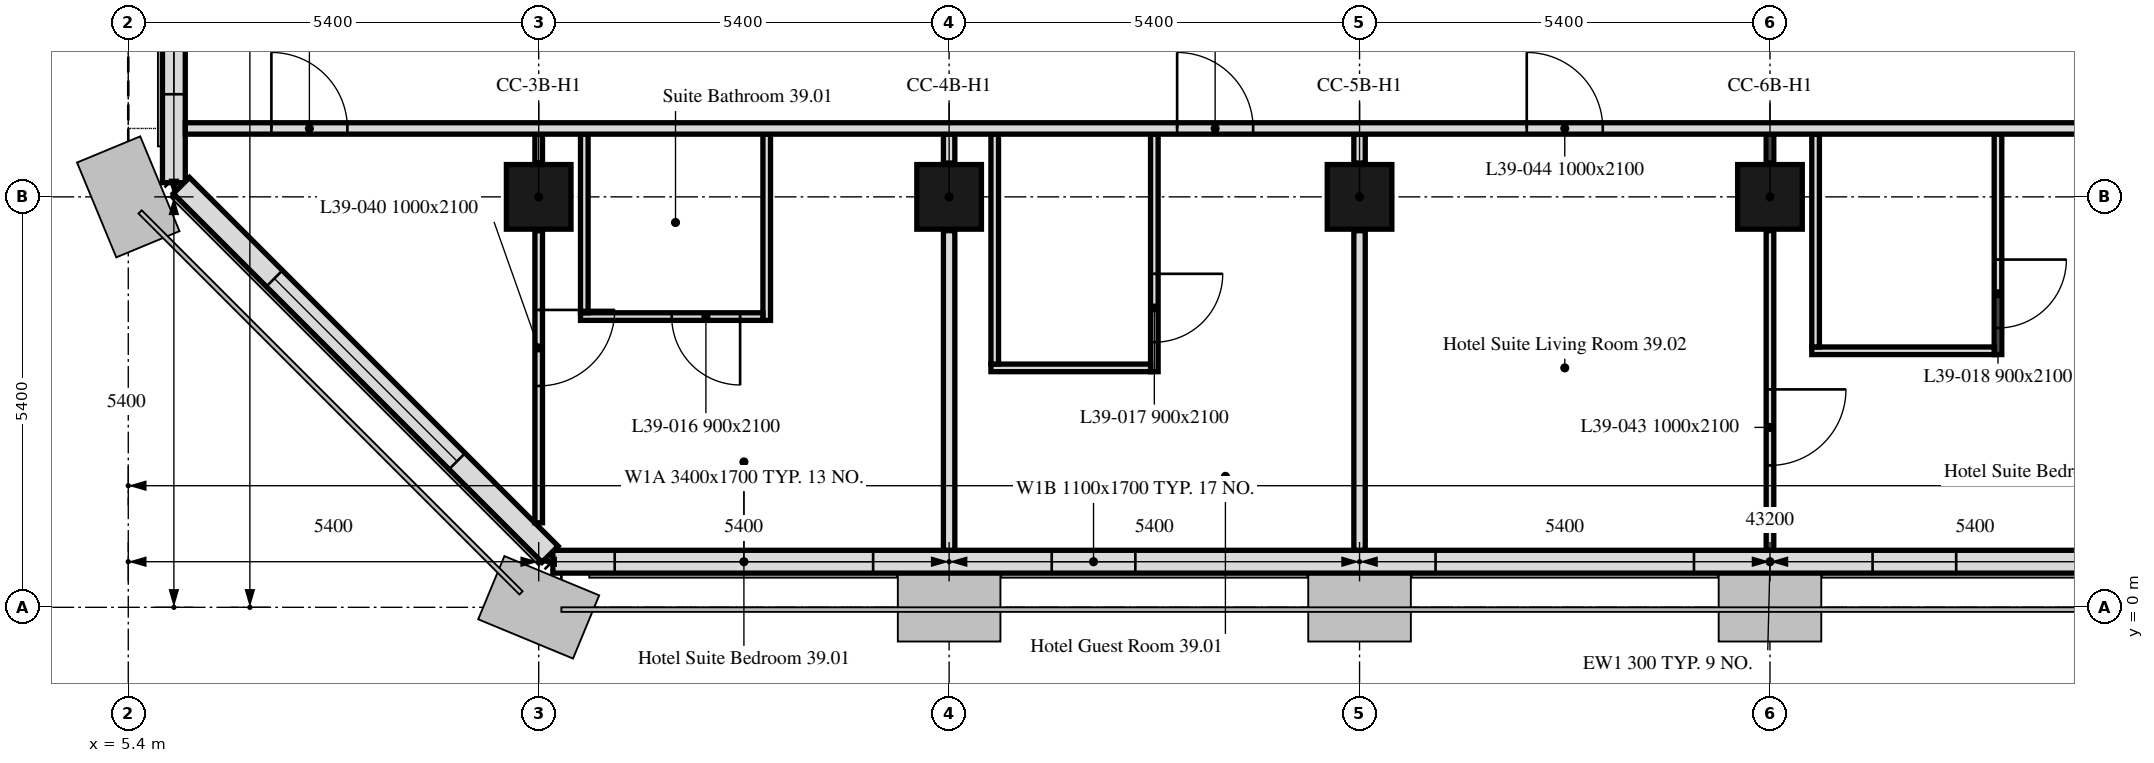
"""IFC4 building model, lengths in metres.
Left out: names, types, materials, properties, quantities, classifications, styles, units other than length and angle.
Written with IfcOpenShell. Run it as: python <this file> out.ifc"""

import sys

from ifc_helpers import new_model, si_unit, direction, frame, frame_2d, origin, origin_2d, place, context, subcontext, project, spatial, rectangle, extrude, element, fill, save


model = new_model("IFC4")
c1 = context("Model", 3, precision=1e-05, world=origin(), true_north=direction((0.0, 1.0)))
c2 = subcontext(c1, "Body", "Model", "MODEL_VIEW")
j1 = project(units=[si_unit("LENGTHUNIT", "METRE"), si_unit("PLANEANGLEUNIT", "RADIAN")], contexts=[c1])
p1 = place(None, origin())
s1 = spatial("IfcSite", under=j1, at=p1, CompositionType="ELEMENT")
p2 = place(p1, origin())
s2 = spatial("IfcBuilding", under=s1, at=p2, CompositionType="ELEMENT")
p3 = place(p2, frame((0.0, 0.0, 166.0)))
s3 = spatial("IfcBuildingStorey", under=s2, at=p3, CompositionType="ELEMENT", Elevation=166.0)
for number, where, z_axis, x_axis in (
    (1, (10.8, 5.4, 0.0), (0.0, 0.0, 1.0), (1.0, 0.0, 0.0)),
    (2, (16.2, 5.4, 0.0), (0.0, 0.0, 1.0), (1.0, 0.0, 0.0)),
    (3, (21.6, 5.4, 0.0), (0.0, 0.0, 1.0), (1.0, 0.0, 0.0)),
    (4, (27.0, 5.4, 0.0), (0.0, 0.0, 1.0), (1.0, 0.0, 0.0)),
):
    element("IfcColumn", number, at=place(p3, frame(where, z_axis=z_axis, x_axis=x_axis)), inside=s3, PredefinedType="COLUMN", context=c2, shape_type="SweptSolid", body=[
        extrude(rectangle(XDim=0.85, YDim=0.85, at=origin_2d()), origin(), (0.0, 0.0, 1.0), 3.0),
    ])
p4 = place(p3, frame((10.986, 0.6, 0.0), z_axis=(0.0, 0.0, 1.0), x_axis=(1.0, 0.0, 0.0)))
e5 = element("IfcWall", 5, at=p4, inside=s3, PredefinedType="SOLIDWALL", context=c2, shape_type="SweptSolid", body=[
    extrude(rectangle(XDim=32.027, YDim=0.3, at=frame_2d((16.014, 0.0))), origin(), (0.0, 0.0, 1.0), 3.0),
])
p5 = place(p4, frame((0.814, 0.0, 0.9)))
e6 = element("IfcOpeningElement", 6, at=p5, cuts=e5, PredefinedType="OPENING", context=c2, shape_type="SweptSolid", body=[
    extrude(rectangle(XDim=3.4, YDim=1.7, at=frame_2d((1.7, 0.85))), frame((0.0, 0.16, 0.0), z_axis=(0.0, -1.0, 0.0), x_axis=(1.0, 0.0, 0.0)), (0.0, 0.0, 1.0), 0.32),
])
p6 = place(p4, frame((6.564, 0.0, 0.9)))
e7 = element("IfcOpeningElement", 7, at=p6, cuts=e5, PredefinedType="OPENING", context=c2, shape_type="SweptSolid", body=[
    extrude(rectangle(XDim=1.1, YDim=1.7, at=frame_2d((0.55, 0.85))), frame((0.0, 0.16, 0.0), z_axis=(0.0, -1.0, 0.0), x_axis=(1.0, 0.0, 0.0)), (0.0, 0.0, 1.0), 0.32),
])
p7 = place(p4, frame((11.614, 0.0, 0.9)))
e8 = element("IfcOpeningElement", 8, at=p7, cuts=e5, PredefinedType="OPENING", context=c2, shape_type="SweptSolid", body=[
    extrude(rectangle(XDim=3.4, YDim=1.7, at=frame_2d((1.7, 0.85))), frame((0.0, 0.16, 0.0), z_axis=(0.0, -1.0, 0.0), x_axis=(1.0, 0.0, 0.0)), (0.0, 0.0, 1.0), 0.32),
])
p8 = place(p4, frame((17.364, 0.0, 0.9)))
e9 = element("IfcOpeningElement", 9, at=p8, cuts=e5, PredefinedType="OPENING", context=c2, shape_type="SweptSolid", body=[
    extrude(rectangle(XDim=1.1, YDim=1.7, at=frame_2d((0.55, 0.85))), frame((0.0, 0.16, 0.0), z_axis=(0.0, -1.0, 0.0), x_axis=(1.0, 0.0, 0.0)), (0.0, 0.0, 1.0), 0.32),
])
p9 = place(p4, frame((22.414, 0.0, 0.9)))
e10 = element("IfcOpeningElement", 10, at=p9, cuts=e5, PredefinedType="OPENING", context=c2, shape_type="SweptSolid", body=[
    extrude(rectangle(XDim=3.4, YDim=1.7, at=frame_2d((1.7, 0.85))), frame((0.0, 0.16, 0.0), z_axis=(0.0, -1.0, 0.0), x_axis=(1.0, 0.0, 0.0)), (0.0, 0.0, 1.0), 0.32),
])
p10 = place(p4, frame((28.164, 0.0, 0.9)))
e11 = element("IfcOpeningElement", 11, at=p10, cuts=e5, PredefinedType="OPENING", context=c2, shape_type="SweptSolid", body=[
    extrude(rectangle(XDim=1.1, YDim=1.7, at=frame_2d((0.55, 0.85))), frame((0.0, 0.16, 0.0), z_axis=(0.0, -1.0, 0.0), x_axis=(1.0, 0.0, 0.0)), (0.0, 0.0, 1.0), 0.32),
])
p11 = place(p3, frame((6.0, 16.2, 0.0), z_axis=(0.0, 0.0, 1.0), x_axis=(0.0, -1.0, 0.0)))
e12 = element("IfcWall", 12, at=p11, inside=s3, PredefinedType="SOLIDWALL", context=c2, shape_type="SweptSolid", body=[
    extrude(rectangle(XDim=10.614, YDim=0.3, at=frame_2d((5.307, 0.0))), origin(), (0.0, 0.0, 1.0), 3.0),
])
p12 = place(p11, frame((1.0, 0.0, 0.9)))
e13 = element("IfcOpeningElement", 13, at=p12, cuts=e12, PredefinedType="OPENING", context=c2, shape_type="SweptSolid", body=[
    extrude(rectangle(XDim=3.4, YDim=1.7, at=frame_2d((1.7, 0.85))), frame((0.0, 0.16, 0.0), z_axis=(0.0, -1.0, 0.0), x_axis=(1.0, 0.0, 0.0)), (0.0, 0.0, 1.0), 0.32),
])
p13 = place(p11, frame((6.75, 0.0, 0.9)))
e14 = element("IfcOpeningElement", 14, at=p13, cuts=e12, PredefinedType="OPENING", context=c2, shape_type="SweptSolid", body=[
    extrude(rectangle(XDim=1.1, YDim=1.7, at=frame_2d((0.55, 0.85))), frame((0.0, 0.16, 0.0), z_axis=(0.0, -1.0, 0.0), x_axis=(1.0, 0.0, 0.0)), (0.0, 0.0, 1.0), 0.32),
])
p14 = place(p11, frame((8.35, 0.0, 0.9)))
e15 = element("IfcOpeningElement", 15, at=p14, cuts=e12, PredefinedType="OPENING", context=c2, shape_type="SweptSolid", body=[
    extrude(rectangle(XDim=1.1, YDim=1.7, at=frame_2d((0.55, 0.85))), frame((0.0, 0.16, 0.0), z_axis=(0.0, -1.0, 0.0), x_axis=(1.0, 0.0, 0.0)), (0.0, 0.0, 1.0), 0.32),
])
p15 = place(p3, frame((6.099, 5.55, 0.0), z_axis=(0.0, 0.0, 1.0), x_axis=(0.707106781187, -0.707106781187, 0.0)))
e16 = element("IfcWall", 16, at=p15, inside=s3, PredefinedType="SOLIDWALL", context=c2, shape_type="SweptSolid", body=[
    extrude(rectangle(XDim=6.86, YDim=0.3, at=frame_2d((3.43, 0.0))), origin(), (0.0, 0.0, 1.0), 3.0),
])
p16 = place(p15, frame((1.73, 0.0, 0.9)))
e17 = element("IfcOpeningElement", 17, at=p16, cuts=e16, PredefinedType="OPENING", context=c2, shape_type="SweptSolid", body=[
    extrude(rectangle(XDim=3.4, YDim=1.7, at=frame_2d((1.7, 0.85))), frame((0.0, 0.16, 0.0), z_axis=(0.0, -1.0, 0.0), x_axis=(1.0, 0.0, 0.0)), (0.0, 0.0, 1.0), 0.32),
])
p17 = place(p3, frame((16.2, 0.751, 0.0), z_axis=(0.0, 0.0, 1.0), x_axis=(0.0, 1.0, 0.0)))
e18 = element("IfcWall", 18, at=p17, inside=s3, PredefinedType="PARTITIONING", context=c2, shape_type="SweptSolid", body=[
    extrude(rectangle(XDim=4.204, YDim=0.15, at=frame_2d((2.102, 0.0))), origin(), (0.0, 0.0, 1.0), 2.4),
])
p18 = place(p3, frame((16.2, 5.845, 0.0), z_axis=(0.0, 0.0, 1.0), x_axis=(0.0, 1.0, 0.0)))
e19 = element("IfcWall", 19, at=p18, inside=s3, PredefinedType="PARTITIONING", context=c2, shape_type="SweptSolid", body=[
    extrude(rectangle(XDim=0.38, YDim=0.15, at=frame_2d((0.19, 0.0))), origin(), (0.0, 0.0, 1.0), 2.4),
])
p19 = place(p3, frame((13.8, 6.225, 0.0), z_axis=(0.0, 0.0, 1.0), x_axis=(0.0, -1.0, 0.0)))
e20 = element("IfcWall", 20, at=p19, inside=s3, PredefinedType="PARTITIONING", context=c2, shape_type="SweptSolid", body=[
    extrude(rectangle(XDim=2.45, YDim=0.1, at=frame_2d((1.225, 0.0))), origin(), (0.0, 0.0, 1.0), 3.0),
])
p20 = place(p3, frame((13.75, 3.825, 0.0), z_axis=(0.0, 0.0, 1.0), x_axis=(-1.0, 0.0, 0.0)))
e21 = element("IfcWall", 21, at=p20, inside=s3, PredefinedType="PARTITIONING", context=c2, shape_type="SweptSolid", body=[
    extrude(rectangle(XDim=2.4, YDim=0.1, at=frame_2d((1.2, 0.0))), origin(), (0.0, 0.0, 1.0), 3.0),
])
p21 = place(p20, frame((0.3, 0.0, 0.0)))
e22 = element("IfcOpeningElement", 22, at=p21, cuts=e21, PredefinedType="OPENING", context=c2, shape_type="SweptSolid", body=[
    extrude(rectangle(XDim=0.9, YDim=2.1, at=frame_2d((0.45, 1.05))), frame((0.0, 0.05, 0.0), z_axis=(0.0, -1.0, 0.0), x_axis=(1.0, 0.0, 0.0)), (0.0, 0.0, 1.0), 0.1),
])
p22 = place(p3, frame((11.4, 3.875, 0.0), z_axis=(0.0, 0.0, 1.0), x_axis=(0.0, 1.0, 0.0)))
e23 = element("IfcWall", 23, at=p22, inside=s3, PredefinedType="PARTITIONING", context=c2, shape_type="SweptSolid", body=[
    extrude(rectangle(XDim=2.35, YDim=0.1, at=frame_2d((1.175, 0.0))), origin(), (0.0, 0.0, 1.0), 3.0),
])
p23 = place(p3, frame((10.8, 6.225, 0.0), z_axis=(0.0, 0.0, 1.0), x_axis=(0.0, -1.0, 0.0)))
e24 = element("IfcWall", 24, at=p23, inside=s3, PredefinedType="PARTITIONING", context=c2, shape_type="SweptSolid", body=[
    extrude(rectangle(XDim=0.38, YDim=0.1, at=frame_2d((0.19, 0.0))), origin(), (0.0, 0.0, 1.0), 3.0),
])
p24 = place(p3, frame((10.8, 4.955, 0.0), z_axis=(0.0, 0.0, 1.0), x_axis=(0.0, -1.0, 0.0)))
e25 = element("IfcWall", 25, at=p24, inside=s3, PredefinedType="PARTITIONING", context=c2, shape_type="SweptSolid", body=[
    extrude(rectangle(XDim=3.843, YDim=0.1, at=frame_2d((1.921, 0.0))), origin(), (0.0, 0.0, 1.0), 3.0),
])
p25 = place(p24, frame((1.042, 0.0, 0.0)))
e26 = element("IfcOpeningElement", 26, at=p25, cuts=e25, PredefinedType="OPENING", context=c2, shape_type="SweptSolid", body=[
    extrude(rectangle(XDim=1.0, YDim=2.1, at=frame_2d((0.5, 1.05))), frame((0.0, 0.05, 0.0), z_axis=(0.0, -1.0, 0.0), x_axis=(1.0, 0.0, 0.0)), (0.0, 0.0, 1.0), 0.1),
])
p26 = place(p3, frame((21.6, 0.751, 0.0), z_axis=(0.0, 0.0, 1.0), x_axis=(0.0, 1.0, 0.0)))
e27 = element("IfcWall", 27, at=p26, inside=s3, PredefinedType="PARTITIONING", context=c2, shape_type="SweptSolid", body=[
    extrude(rectangle(XDim=4.204, YDim=0.15, at=frame_2d((2.102, 0.0))), origin(), (0.0, 0.0, 1.0), 2.4),
])
p27 = place(p3, frame((21.6, 5.845, 0.0), z_axis=(0.0, 0.0, 1.0), x_axis=(0.0, 1.0, 0.0)))
e28 = element("IfcWall", 28, at=p27, inside=s3, PredefinedType="PARTITIONING", context=c2, shape_type="SweptSolid", body=[
    extrude(rectangle(XDim=0.38, YDim=0.15, at=frame_2d((0.19, 0.0))), origin(), (0.0, 0.0, 1.0), 2.4),
])
p28 = place(p3, frame((18.9, 6.225, 0.0), z_axis=(0.0, 0.0, 1.0), x_axis=(0.0, -1.0, 0.0)))
e29 = element("IfcWall", 29, at=p28, inside=s3, PredefinedType="PARTITIONING", context=c2, shape_type="SweptSolid", body=[
    extrude(rectangle(XDim=3.125, YDim=0.1, at=frame_2d((1.562, 0.0))), origin(), (0.0, 0.0, 1.0), 3.0),
])
p29 = place(p28, frame((1.837, 0.0, 0.0)))
e30 = element("IfcOpeningElement", 30, at=p29, cuts=e29, PredefinedType="OPENING", context=c2, shape_type="SweptSolid", body=[
    extrude(rectangle(XDim=0.9, YDim=2.1, at=frame_2d((0.45, 1.05))), frame((0.0, 0.05, 0.0), z_axis=(0.0, -1.0, 0.0), x_axis=(1.0, 0.0, 0.0)), (0.0, 0.0, 1.0), 0.1),
])
p30 = place(p3, frame((18.85, 3.15, 0.0), z_axis=(0.0, 0.0, 1.0), x_axis=(-1.0, 0.0, 0.0)))
e31 = element("IfcWall", 31, at=p30, inside=s3, PredefinedType="PARTITIONING", context=c2, shape_type="SweptSolid", body=[
    extrude(rectangle(XDim=2.1, YDim=0.1, at=frame_2d((1.05, 0.0))), origin(), (0.0, 0.0, 1.0), 3.0),
])
p31 = place(p3, frame((16.8, 3.2, 0.0), z_axis=(0.0, 0.0, 1.0), x_axis=(0.0, 1.0, 0.0)))
e32 = element("IfcWall", 32, at=p31, inside=s3, PredefinedType="PARTITIONING", context=c2, shape_type="SweptSolid", body=[
    extrude(rectangle(XDim=3.025, YDim=0.1, at=frame_2d((1.513, 0.0))), origin(), (0.0, 0.0, 1.0), 3.0),
])
p32 = place(p3, frame((30.0, 6.225, 0.0), z_axis=(0.0, 0.0, 1.0), x_axis=(0.0, -1.0, 0.0)))
e33 = element("IfcWall", 33, at=p32, inside=s3, PredefinedType="PARTITIONING", context=c2, shape_type="SweptSolid", body=[
    extrude(rectangle(XDim=2.9, YDim=0.1, at=frame_2d((1.45, 0.0))), origin(), (0.0, 0.0, 1.0), 3.0),
])
p33 = place(p32, frame((1.65, 0.0, 0.0)))
e34 = element("IfcOpeningElement", 34, at=p33, cuts=e33, PredefinedType="OPENING", context=c2, shape_type="SweptSolid", body=[
    extrude(rectangle(XDim=0.9, YDim=2.1, at=frame_2d((0.45, 1.05))), frame((0.0, 0.05, 0.0), z_axis=(0.0, -1.0, 0.0), x_axis=(1.0, 0.0, 0.0)), (0.0, 0.0, 1.0), 0.1),
])
p34 = place(p3, frame((29.95, 3.375, 0.0), z_axis=(0.0, 0.0, 1.0), x_axis=(-1.0, 0.0, 0.0)))
e35 = element("IfcWall", 35, at=p34, inside=s3, PredefinedType="PARTITIONING", context=c2, shape_type="SweptSolid", body=[
    extrude(rectangle(XDim=2.4, YDim=0.1, at=frame_2d((1.2, 0.0))), origin(), (0.0, 0.0, 1.0), 3.0),
])
p35 = place(p3, frame((27.6, 3.425, 0.0), z_axis=(0.0, 0.0, 1.0), x_axis=(0.0, 1.0, 0.0)))
e36 = element("IfcWall", 36, at=p35, inside=s3, PredefinedType="PARTITIONING", context=c2, shape_type="SweptSolid", body=[
    extrude(rectangle(XDim=2.8, YDim=0.1, at=frame_2d((1.4, 0.0))), origin(), (0.0, 0.0, 1.0), 3.0),
])
p36 = place(p3, frame((27.0, 6.225, 0.0), z_axis=(0.0, 0.0, 1.0), x_axis=(0.0, -1.0, 0.0)))
e37 = element("IfcWall", 37, at=p36, inside=s3, PredefinedType="PARTITIONING", context=c2, shape_type="SweptSolid", body=[
    extrude(rectangle(XDim=0.38, YDim=0.1, at=frame_2d((0.19, 0.0))), origin(), (0.0, 0.0, 1.0), 2.4),
])
p37 = place(p3, frame((27.0, 4.955, 0.0), z_axis=(0.0, 0.0, 1.0), x_axis=(0.0, -1.0, 0.0)))
e38 = element("IfcWall", 38, at=p37, inside=s3, PredefinedType="PARTITIONING", context=c2, shape_type="SweptSolid", body=[
    extrude(rectangle(XDim=4.204, YDim=0.1, at=frame_2d((2.102, 0.0))), origin(), (0.0, 0.0, 1.0), 2.4),
])
p38 = place(p37, frame((2.088, 0.0, 0.0)))
e39 = element("IfcOpeningElement", 39, at=p38, cuts=e38, PredefinedType="OPENING", context=c2, shape_type="SweptSolid", body=[
    extrude(rectangle(XDim=1.0, YDim=2.1, at=frame_2d((0.5, 1.05))), frame((0.0, 0.05, 0.0), z_axis=(0.0, -1.0, 0.0), x_axis=(1.0, 0.0, 0.0)), (0.0, 0.0, 1.0), 0.1),
])
p39 = place(p3, frame((6.151, 6.3, 0.0), z_axis=(0.0, 0.0, 1.0), x_axis=(1.0, 0.0, 0.0)))
e40 = element("IfcWall", 40, at=p39, inside=s3, PredefinedType="PARTITIONING", context=c2, shape_type="SweptSolid", body=[
    extrude(rectangle(XDim=41.698, YDim=0.15, at=frame_2d((20.849, 0.0))), origin(), (0.0, 0.0, 1.0), 2.4),
])
p40 = place(p39, frame((1.132, 0.0, 0.0)))
e41 = element("IfcOpeningElement", 41, at=p40, cuts=e40, PredefinedType="OPENING", context=c2, shape_type="SweptSolid", body=[
    extrude(rectangle(XDim=1.0, YDim=2.1, at=frame_2d((0.5, 1.05))), frame((0.0, 0.075, 0.0), z_axis=(0.0, -1.0, 0.0), x_axis=(1.0, 0.0, 0.0)), (0.0, 0.0, 1.0), 0.15),
])
p41 = place(p39, frame((13.049, 0.0, 0.0)))
e42 = element("IfcOpeningElement", 42, at=p41, cuts=e40, PredefinedType="OPENING", context=c2, shape_type="SweptSolid", body=[
    extrude(rectangle(XDim=1.0, YDim=2.1, at=frame_2d((0.5, 1.05))), frame((0.0, 0.075, 0.0), z_axis=(0.0, -1.0, 0.0), x_axis=(1.0, 0.0, 0.0)), (0.0, 0.0, 1.0), 0.15),
])
p42 = place(p39, frame((17.649, 0.0, 0.0)))
e43 = element("IfcOpeningElement", 43, at=p42, cuts=e40, PredefinedType="OPENING", context=c2, shape_type="SweptSolid", body=[
    extrude(rectangle(XDim=1.0, YDim=2.1, at=frame_2d((0.5, 1.05))), frame((0.0, 0.075, 0.0), z_axis=(0.0, -1.0, 0.0), x_axis=(1.0, 0.0, 0.0)), (0.0, 0.0, 1.0), 0.15),
])
p43 = place(p39, frame((29.249, 0.0, 0.0)))
e44 = element("IfcOpeningElement", 44, at=p43, cuts=e40, PredefinedType="OPENING", context=c2, shape_type="SweptSolid", body=[
    extrude(rectangle(XDim=1.0, YDim=2.1, at=frame_2d((0.5, 1.05))), frame((0.0, 0.075, 0.0), z_axis=(0.0, -1.0, 0.0), x_axis=(1.0, 0.0, 0.0)), (0.0, 0.0, 1.0), 0.15),
])
p44 = place(p39, frame((37.599, 0.0, 0.0)))
e45 = element("IfcOpeningElement", 45, at=p44, cuts=e40, PredefinedType="OPENING", context=c2, shape_type="SweptSolid", body=[
    extrude(rectangle(XDim=1.0, YDim=2.1, at=frame_2d((0.5, 1.05))), frame((0.0, 0.075, 0.0), z_axis=(0.0, -1.0, 0.0), x_axis=(1.0, 0.0, 0.0)), (0.0, 0.0, 1.0), 0.15),
])
p45 = place(p5, origin())
e46 = element("IfcWindow", 46, at=p45, inside=s3, PartitioningType="SINGLE_PANEL", PredefinedType="WINDOW", context=c2, shape_type="SweptSolid", body=[
    extrude(rectangle(XDim=3.4, YDim=1.7, at=frame_2d((1.7, 0.85))), frame((0.0, 0.03, 0.0), z_axis=(0.0, -1.0, 0.0), x_axis=(1.0, 0.0, 0.0)), (0.0, 0.0, 1.0), 0.06),
])
fill(e6, e46)
p46 = place(p6, origin())
e47 = element("IfcWindow", 47, at=p46, inside=s3, PartitioningType="SINGLE_PANEL", PredefinedType="WINDOW", context=c2, shape_type="SweptSolid", body=[
    extrude(rectangle(XDim=1.1, YDim=1.7, at=frame_2d((0.55, 0.85))), frame((0.0, 0.03, 0.0), z_axis=(0.0, -1.0, 0.0), x_axis=(1.0, 0.0, 0.0)), (0.0, 0.0, 1.0), 0.06),
])
fill(e7, e47)
p47 = place(p7, origin())
e48 = element("IfcWindow", 48, at=p47, inside=s3, PartitioningType="SINGLE_PANEL", PredefinedType="WINDOW", context=c2, shape_type="SweptSolid", body=[
    extrude(rectangle(XDim=3.4, YDim=1.7, at=frame_2d((1.7, 0.85))), frame((0.0, 0.03, 0.0), z_axis=(0.0, -1.0, 0.0), x_axis=(1.0, 0.0, 0.0)), (0.0, 0.0, 1.0), 0.06),
])
fill(e8, e48)
p48 = place(p8, origin())
e49 = element("IfcWindow", 49, at=p48, inside=s3, PartitioningType="SINGLE_PANEL", PredefinedType="WINDOW", context=c2, shape_type="SweptSolid", body=[
    extrude(rectangle(XDim=1.1, YDim=1.7, at=frame_2d((0.55, 0.85))), frame((0.0, 0.03, 0.0), z_axis=(0.0, -1.0, 0.0), x_axis=(1.0, 0.0, 0.0)), (0.0, 0.0, 1.0), 0.06),
])
fill(e9, e49)
p49 = place(p14, origin())
e50 = element("IfcWindow", 50, at=p49, inside=s3, PartitioningType="SINGLE_PANEL", PredefinedType="WINDOW", context=c2, shape_type="SweptSolid", body=[
    extrude(rectangle(XDim=1.1, YDim=1.7, at=frame_2d((0.55, 0.85))), frame((0.0, 0.03, 0.0), z_axis=(0.0, -1.0, 0.0), x_axis=(1.0, 0.0, 0.0)), (0.0, 0.0, 1.0), 0.06),
])
fill(e15, e50)
p50 = place(p16, origin())
e51 = element("IfcWindow", 51, at=p50, inside=s3, PartitioningType="SINGLE_PANEL", PredefinedType="WINDOW", context=c2, shape_type="SweptSolid", body=[
    extrude(rectangle(XDim=3.4, YDim=1.7, at=frame_2d((1.7, 0.85))), frame((0.0, 0.03, 0.0), z_axis=(0.0, -1.0, 0.0), x_axis=(1.0, 0.0, 0.0)), (0.0, 0.0, 1.0), 0.06),
])
fill(e17, e51)
p51 = place(p21, origin())
e52 = element("IfcDoor", 52, at=p51, inside=s3, OperationType="SINGLE_SWING_RIGHT", PredefinedType="DOOR", context=c2, shape_type="SweptSolid", body=[
    extrude(rectangle(XDim=0.9, YDim=2.1, at=frame_2d((0.45, 1.05))), frame((0.0, 0.025, 0.0), z_axis=(0.0, -1.0, 0.0), x_axis=(1.0, 0.0, 0.0)), (0.0, 0.0, 1.0), 0.05),
])
fill(e22, e52)
p52 = place(p29, origin())
e53 = element("IfcDoor", 53, at=p52, inside=s3, OperationType="SINGLE_SWING_RIGHT", PredefinedType="DOOR", context=c2, shape_type="SweptSolid", body=[
    extrude(rectangle(XDim=0.9, YDim=2.1, at=frame_2d((0.45, 1.05))), frame((0.0, 0.025, 0.0), z_axis=(0.0, -1.0, 0.0), x_axis=(1.0, 0.0, 0.0)), (0.0, 0.0, 1.0), 0.05),
])
fill(e30, e53)
p53 = place(p33, origin())
e54 = element("IfcDoor", 54, at=p53, inside=s3, OperationType="SINGLE_SWING_LEFT", PredefinedType="DOOR", context=c2, shape_type="SweptSolid", body=[
    extrude(rectangle(XDim=0.9, YDim=2.1, at=frame_2d((0.45, 1.05))), frame((0.0, 0.025, 0.0), z_axis=(0.0, -1.0, 0.0), x_axis=(1.0, 0.0, 0.0)), (0.0, 0.0, 1.0), 0.05),
])
fill(e34, e54)
p54 = place(p25, origin())
e55 = element("IfcDoor", 55, at=p54, inside=s3, OperationType="SINGLE_SWING_RIGHT", PredefinedType="DOOR", context=c2, shape_type="SweptSolid", body=[
    extrude(rectangle(XDim=1.0, YDim=2.1, at=frame_2d((0.5, 1.05))), frame((0.0, 0.025, 0.0), z_axis=(0.0, -1.0, 0.0), x_axis=(1.0, 0.0, 0.0)), (0.0, 0.0, 1.0), 0.05),
])
fill(e26, e55)
p55 = place(p40, origin())
e56 = element("IfcDoor", 56, at=p55, inside=s3, OperationType="SINGLE_SWING_LEFT", PredefinedType="DOOR", context=c2, shape_type="SweptSolid", body=[
    extrude(rectangle(XDim=1.0, YDim=2.1, at=frame_2d((0.5, 1.05))), frame((0.0, 0.025, 0.0), z_axis=(0.0, -1.0, 0.0), x_axis=(1.0, 0.0, 0.0)), (0.0, 0.0, 1.0), 0.05),
])
fill(e41, e56)
p56 = place(p41, origin())
e57 = element("IfcDoor", 57, at=p56, inside=s3, OperationType="SINGLE_SWING_LEFT", PredefinedType="DOOR", context=c2, shape_type="SweptSolid", body=[
    extrude(rectangle(XDim=1.0, YDim=2.1, at=frame_2d((0.5, 1.05))), frame((0.0, 0.025, 0.0), z_axis=(0.0, -1.0, 0.0), x_axis=(1.0, 0.0, 0.0)), (0.0, 0.0, 1.0), 0.05),
])
fill(e42, e57)
p57 = place(p38, origin())
e58 = element("IfcDoor", 58, at=p57, inside=s3, OperationType="SINGLE_SWING_LEFT", PredefinedType="DOOR", context=c2, shape_type="SweptSolid", body=[
    extrude(rectangle(XDim=1.0, YDim=2.1, at=frame_2d((0.5, 1.05))), frame((0.0, 0.025, 0.0), z_axis=(0.0, -1.0, 0.0), x_axis=(1.0, 0.0, 0.0)), (0.0, 0.0, 1.0), 0.05),
])
fill(e39, e58)
p58 = place(p42, origin())
e59 = element("IfcDoor", 59, at=p58, inside=s3, OperationType="SINGLE_SWING_RIGHT", PredefinedType="DOOR", context=c2, shape_type="SweptSolid", body=[
    extrude(rectangle(XDim=1.0, YDim=2.1, at=frame_2d((0.5, 1.05))), frame((0.0, 0.025, 0.0), z_axis=(0.0, -1.0, 0.0), x_axis=(1.0, 0.0, 0.0)), (0.0, 0.0, 1.0), 0.05),
])
fill(e43, e59)
save(model, sys.argv[1])
